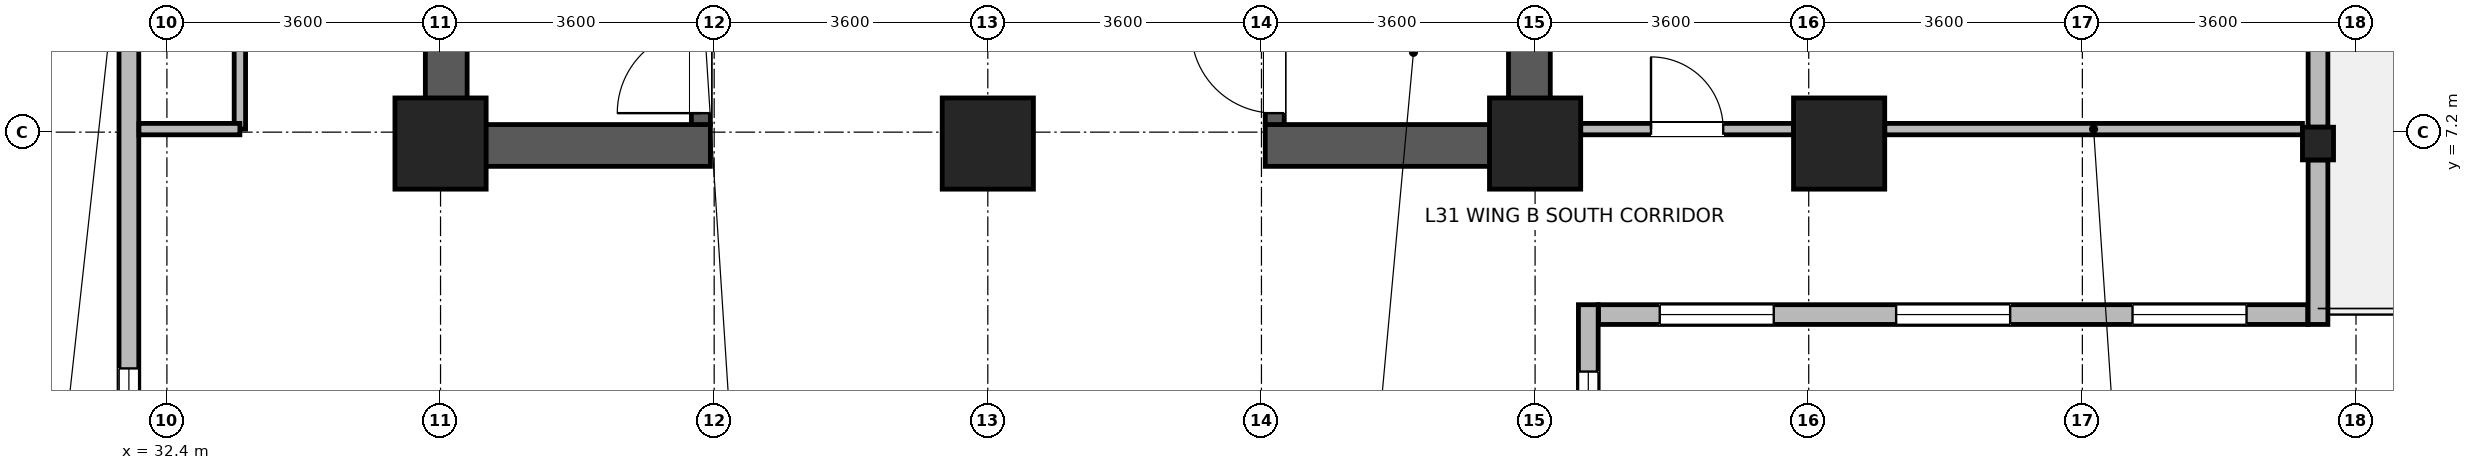
"""IFC4 building model, lengths in metres.
Left out: names, types, materials, properties, quantities, classifications, styles, units other than length and angle.
Written with IfcOpenShell. Run it as: python <this file> out.ifc"""

import sys

from ifc_helpers import new_model, si_unit, direction, frame, frame_2d, origin, origin_2d, place, context, subcontext, project, spatial, rectangle, i_section, extrude, source, transform, mapped, element, fill, save


model = new_model("IFC4")
c1 = context("Model", 3, precision=1e-05, world=origin(), true_north=direction((0.0, 1.0)))
c2 = subcontext(c1, "Body", "Model", "MODEL_VIEW")
j1 = project(units=[si_unit("LENGTHUNIT", "METRE"), si_unit("PLANEANGLEUNIT", "RADIAN")], contexts=[c1])
p1 = place(None, origin())
s1 = spatial("IfcSite", under=j1, at=p1, CompositionType="ELEMENT")
p2 = place(p1, origin())
s2 = spatial("IfcBuilding", under=s1, at=p2, CompositionType="ELEMENT")
p3 = place(p2, frame((0.0, 0.0, 123.0)))
s3 = spatial("IfcBuildingStorey", under=s2, at=p3, CompositionType="ELEMENT", Elevation=123.0)
for number, where, z_axis, x_axis in (
    (1, (36.075, 6.75, 0.0), (0.0, 0.0, 1.0), (0.0, 1.0, 0.0)),
    (2, (50.325, 6.75, 0.0), (0.0, 0.0, 1.0), (0.0, 1.0, 0.0)),
):
    element("IfcWall", number, at=place(p3, frame(where, z_axis=z_axis, x_axis=x_axis)), inside=s3, PredefinedType="SHEAR", context=c2, shape_type="SweptSolid", body=[
        extrude(rectangle(XDim=8.1, YDim=0.55, at=frame_2d((4.05, 0.0))), origin(), (0.0, 0.0, 1.0), 3.45),
    ])
for number, where, z_axis, x_axis in (
    (3, (36.35, 7.025, 0.0), (0.0, 0.0, 1.0), (1.0, 0.0, 0.0)),
    (4, (46.85, 7.025, 0.0), (0.0, 0.0, 1.0), (1.0, 0.0, 0.0)),
):
    element("IfcWall", number, at=place(p3, frame(where, z_axis=z_axis, x_axis=x_axis)), inside=s3, PredefinedType="SHEAR", context=c2, shape_type="SweptSolid", body=[
        extrude(rectangle(XDim=3.2, YDim=0.55, at=frame_2d((1.6, 0.0))), origin(), (0.0, 0.0, 1.0), 3.45),
    ])
p4 = place(p3, frame((39.425, 7.3, 0.0), z_axis=(0.0, 0.0, 1.0), x_axis=(0.0, 1.0, 0.0)))
e5 = element("IfcWall", 5, at=p4, inside=s3, PredefinedType="SHEAR", context=c2, shape_type="SweptSolid", body=[
    extrude(rectangle(XDim=7.0, YDim=0.25, at=frame_2d((3.5, 0.0))), origin(), (0.0, 0.0, 1.0), 3.45),
])
p5 = place(p4, frame((0.15, 0.0, 0.0)))
e6 = element("IfcOpeningElement", 6, at=p5, cuts=e5, PredefinedType="OPENING", context=c2, shape_type="SweptSolid", body=[
    extrude(rectangle(XDim=1.1, YDim=2.08, at=frame_2d((0.55, 1.04))), frame((0.0, 0.135, 0.0), z_axis=(0.0, -1.0, 0.0), x_axis=(1.0, 0.0, 0.0)), (0.0, 0.0, 1.0), 0.27),
])
p6 = place(p3, frame((46.975, 7.3, 0.0), z_axis=(0.0, 0.0, 1.0), x_axis=(0.0, 1.0, 0.0)))
e7 = element("IfcWall", 7, at=p6, inside=s3, PredefinedType="SHEAR", context=c2, shape_type="SweptSolid", body=[
    extrude(rectangle(XDim=7.0, YDim=0.25, at=frame_2d((3.5, 0.0))), origin(), (0.0, 0.0, 1.0), 3.45),
])
p7 = place(p6, frame((0.15, 0.0, 0.0)))
e8 = element("IfcOpeningElement", 8, at=p7, cuts=e7, PredefinedType="OPENING", context=c2, shape_type="SweptSolid", body=[
    extrude(rectangle(XDim=1.1, YDim=2.08, at=frame_2d((0.55, 1.04))), frame((0.0, 0.135, 0.0), z_axis=(0.0, -1.0, 0.0), x_axis=(1.0, 0.0, 0.0)), (0.0, 0.0, 1.0), 0.27),
])
m1 = source(origin(), c2, "Body", "SweptSolid", [
    extrude(rectangle(XDim=1.2, YDim=1.2, at=origin_2d()), origin(), (0.0, 0.0, 1.0), 3.7),
])
for number, where, z_axis, x_axis in (
    (9, (36.0, 7.05, 0.0), (0.0, 0.0, 1.0), (1.0, 0.0, 0.0)),
    (10, (43.2, 7.05, 0.0), (0.0, 0.0, 1.0), (1.0, 0.0, 0.0)),
    (11, (50.4, 7.05, 0.0), (0.0, 0.0, 1.0), (1.0, 0.0, 0.0)),
    (12, (54.4, 7.05, 0.0), (0.0, 0.0, 1.0), (1.0, 0.0, 0.0)),
):
    element("IfcColumn", number, at=place(p3, frame(where, z_axis=z_axis, x_axis=x_axis)), inside=s3, PredefinedType="COLUMN", context=c2, shape_type="MappedRepresentation", body=[
        mapped(m1, transform((0.0, 0.0, 0.0), x_axis=(1.0, 0.0, 0.0), y_axis=(0.0, 1.0, 0.0), z_axis=(0.0, 0.0, 1.0), scale=1.0)),
    ])
m2 = source(origin(), c2, "Body", "SweptSolid", [
    extrude(i_section(OverallWidth=0.409, OverallDepth=0.43, WebThickness=0.024, FlangeThickness=0.033, FilletRadius=0.015, at=origin_2d()), origin(), (0.0, 0.0, 1.0), 3.7),
])
p8 = place(p3, frame((60.7, 7.05, 0.0), z_axis=(0.0, 0.0, 1.0), x_axis=(1.0, 0.0, 0.0)))
e13 = element("IfcColumn", 13, at=p8, inside=s3, PredefinedType="COLUMN", context=c2, shape_type="MappedRepresentation", body=[
    mapped(m2, transform((0.0, 0.0, 0.0), x_axis=(1.0, 0.0, 0.0), y_axis=(0.0, 1.0, 0.0), z_axis=(0.0, 0.0, 1.0), scale=1.0)),
])
p9 = place(p3, frame((51.1, 4.93, 0.0), z_axis=(0.0, 0.0, 1.0), x_axis=(0.0, -1.0, 0.0)))
e14 = element("IfcWall", 14, at=p9, inside=s3, PredefinedType="STANDARD", context=c2, shape_type="SweptSolid", body=[
    extrude(rectangle(XDim=3.26, YDim=0.26, at=frame_2d((1.63, 0.0))), origin(), (0.0, 0.0, 1.0), 3.43),
])
p10 = place(p9, frame((0.88, 0.0, 0.85)))
e15 = element("IfcOpeningElement", 15, at=p10, cuts=e14, PredefinedType="OPENING", context=c2, shape_type="SweptSolid", body=[
    extrude(rectangle(XDim=1.5, YDim=1.85, at=frame_2d((0.75, 0.925))), frame((0.0, 0.14, 0.0), z_axis=(0.0, -1.0, 0.0), x_axis=(1.0, 0.0, 0.0)), (0.0, 0.0, 1.0), 0.28),
])
p11 = place(p3, frame((60.565, 4.8, 0.0), z_axis=(0.0, 0.0, 1.0), x_axis=(-1.0, 0.0, 0.0)))
e16 = element("IfcWall", 16, at=p11, inside=s3, PredefinedType="STANDARD", context=c2, shape_type="SweptSolid", body=[
    extrude(rectangle(XDim=9.33, YDim=0.26, at=frame_2d((4.665, 0.0))), origin(), (0.0, 0.0, 1.0), 3.43),
])
p12 = place(p11, frame((0.805, 0.0, 0.85)))
e17 = element("IfcOpeningElement", 17, at=p12, cuts=e16, PredefinedType="OPENING", context=c2, shape_type="SweptSolid", body=[
    extrude(rectangle(XDim=1.5, YDim=1.85, at=frame_2d((0.75, 0.925))), frame((0.0, 0.14, 0.0), z_axis=(0.0, -1.0, 0.0), x_axis=(1.0, 0.0, 0.0)), (0.0, 0.0, 1.0), 0.28),
])
p13 = place(p11, frame((3.915, 0.0, 0.85)))
e18 = element("IfcOpeningElement", 18, at=p13, cuts=e16, PredefinedType="OPENING", context=c2, shape_type="SweptSolid", body=[
    extrude(rectangle(XDim=1.5, YDim=1.85, at=frame_2d((0.75, 0.925))), frame((0.0, 0.14, 0.0), z_axis=(0.0, -1.0, 0.0), x_axis=(1.0, 0.0, 0.0)), (0.0, 0.0, 1.0), 0.28),
])
p14 = place(p11, frame((7.025, 0.0, 0.85)))
e19 = element("IfcOpeningElement", 19, at=p14, cuts=e16, PredefinedType="OPENING", context=c2, shape_type="SweptSolid", body=[
    extrude(rectangle(XDim=1.5, YDim=1.85, at=frame_2d((0.75, 0.925))), frame((0.0, 0.14, 0.0), z_axis=(0.0, -1.0, 0.0), x_axis=(1.0, 0.0, 0.0)), (0.0, 0.0, 1.0), 0.28),
])
p15 = place(p3, frame((60.7, 6.834, 0.0), z_axis=(0.0, 0.0, 1.0), x_axis=(0.0, -1.0, 0.0)))
e20 = element("IfcWall", 20, at=p15, inside=s3, PredefinedType="STANDARD", context=c2, shape_type="SweptSolid", body=[
    extrude(rectangle(XDim=2.164, YDim=0.26, at=frame_2d((1.082, 0.0))), origin(), (0.0, 0.0, 1.0), 3.43),
])
p16 = place(p3, frame((60.7, 14.334, 0.0), z_axis=(0.0, 0.0, 1.0), x_axis=(0.0, -1.0, 0.0)))
e21 = element("IfcWall", 21, at=p16, inside=s3, PredefinedType="STANDARD", context=c2, shape_type="SweptSolid", body=[
    extrude(rectangle(XDim=7.068, YDim=0.26, at=frame_2d((3.534, 0.0))), origin(), (0.0, 0.0, 1.0), 2.98),
])
p17 = place(p16, frame((2.784, 0.0, 0.0)))
e22 = element("IfcOpeningElement", 22, at=p17, cuts=e21, PredefinedType="OPENING", context=c2, shape_type="SweptSolid", body=[
    extrude(rectangle(XDim=1.5, YDim=2.15, at=frame_2d((0.75, 1.075))), frame((0.0, 0.14, 0.0), z_axis=(0.0, -1.0, 0.0), x_axis=(1.0, 0.0, 0.0)), (0.0, 0.0, 1.0), 0.28),
])
p18 = place(p16, frame((1.017, 0.0, 0.85)))
e23 = element("IfcOpeningElement", 23, at=p18, cuts=e21, PredefinedType="OPENING", context=c2, shape_type="SweptSolid", body=[
    extrude(rectangle(XDim=1.5, YDim=1.85, at=frame_2d((0.75, 0.925))), frame((0.0, 0.14, 0.0), z_axis=(0.0, -1.0, 0.0), x_axis=(1.0, 0.0, 0.0)), (0.0, 0.0, 1.0), 0.28),
])
p19 = place(p16, frame((4.551, 0.0, 0.85)))
e24 = element("IfcOpeningElement", 24, at=p19, cuts=e21, PredefinedType="OPENING", context=c2, shape_type="SweptSolid", body=[
    extrude(rectangle(XDim=1.5, YDim=1.85, at=frame_2d((0.75, 0.925))), frame((0.0, 0.14, 0.0), z_axis=(0.0, -1.0, 0.0), x_axis=(1.0, 0.0, 0.0)), (0.0, 0.0, 1.0), 0.28),
])
p20 = place(p3, frame((31.9, 1.67, 0.0), z_axis=(0.0, 0.0, 1.0), x_axis=(0.0, 1.0, 0.0)))
e25 = element("IfcWall", 25, at=p20, inside=s3, PredefinedType="STANDARD", context=c2, shape_type="SweptSolid", body=[
    extrude(rectangle(XDim=20.06, YDim=0.26, at=frame_2d((10.03, 0.0))), origin(), (0.0, 0.0, 1.0), 3.43),
])
p21 = place(p20, frame((0.922, 0.0, 0.85)))
e26 = element("IfcOpeningElement", 26, at=p21, cuts=e25, PredefinedType="OPENING", context=c2, shape_type="SweptSolid", body=[
    extrude(rectangle(XDim=1.5, YDim=1.85, at=frame_2d((0.75, 0.925))), frame((0.0, 0.14, 0.0), z_axis=(0.0, -1.0, 0.0), x_axis=(1.0, 0.0, 0.0)), (0.0, 0.0, 1.0), 0.28),
])
p22 = place(p20, frame((7.608, 0.0, 0.85)))
e27 = element("IfcOpeningElement", 27, at=p22, cuts=e25, PredefinedType="OPENING", context=c2, shape_type="SweptSolid", body=[
    extrude(rectangle(XDim=1.5, YDim=1.85, at=frame_2d((0.75, 0.925))), frame((0.0, 0.14, 0.0), z_axis=(0.0, -1.0, 0.0), x_axis=(1.0, 0.0, 0.0)), (0.0, 0.0, 1.0), 0.28),
])
p23 = place(p20, frame((10.952, 0.0, 0.85)))
e28 = element("IfcOpeningElement", 28, at=p23, cuts=e25, PredefinedType="OPENING", context=c2, shape_type="SweptSolid", body=[
    extrude(rectangle(XDim=1.5, YDim=1.85, at=frame_2d((0.75, 0.925))), frame((0.0, 0.14, 0.0), z_axis=(0.0, -1.0, 0.0), x_axis=(1.0, 0.0, 0.0)), (0.0, 0.0, 1.0), 0.28),
])
p24 = place(p20, frame((14.295, 0.0, 0.85)))
e29 = element("IfcOpeningElement", 29, at=p24, cuts=e25, PredefinedType="OPENING", context=c2, shape_type="SweptSolid", body=[
    extrude(rectangle(XDim=1.5, YDim=1.85, at=frame_2d((0.75, 0.925))), frame((0.0, 0.14, 0.0), z_axis=(0.0, -1.0, 0.0), x_axis=(1.0, 0.0, 0.0)), (0.0, 0.0, 1.0), 0.28),
])
p25 = place(p20, frame((17.638, 0.0, 0.85)))
e30 = element("IfcOpeningElement", 30, at=p25, cuts=e25, PredefinedType="OPENING", context=c2, shape_type="SweptSolid", body=[
    extrude(rectangle(XDim=1.5, YDim=1.85, at=frame_2d((0.75, 0.925))), frame((0.0, 0.14, 0.0), z_axis=(0.0, -1.0, 0.0), x_axis=(1.0, 0.0, 0.0)), (0.0, 0.0, 1.0), 0.28),
])
p26 = place(p3, frame((51.0, 7.24, 0.0), z_axis=(0.0, 0.0, 1.0), x_axis=(1.0, 0.0, 0.0)))
e31 = element("IfcWall", 31, at=p26, inside=s3, PredefinedType="PARTITIONING", context=c2, shape_type="SweptSolid", body=[
    extrude(rectangle(XDim=2.8, YDim=0.15, at=frame_2d((1.4, 0.0))), origin(), (0.0, 0.0, 1.0), 2.78),
])
p27 = place(p26, frame((0.925, 0.0, 0.0)))
e32 = element("IfcOpeningElement", 32, at=p27, cuts=e31, PredefinedType="OPENING", context=c2, shape_type="SweptSolid", body=[
    extrude(rectangle(XDim=0.95, YDim=2.1, at=frame_2d((0.475, 1.05))), frame((0.0, 0.085, 0.0), z_axis=(0.0, -1.0, 0.0), x_axis=(1.0, 0.0, 0.0)), (0.0, 0.0, 1.0), 0.17),
])
p28 = place(p3, frame((55.0, 7.24, 0.0), z_axis=(0.0, 0.0, 1.0), x_axis=(1.0, 0.0, 0.0)))
e33 = element("IfcWall", 33, at=p28, inside=s3, PredefinedType="PARTITIONING", context=c2, shape_type="SweptSolid", body=[
    extrude(rectangle(XDim=5.496, YDim=0.15, at=frame_2d((2.748, 0.0))), origin(), (0.0, 0.0, 1.0), 2.78),
])
p29 = place(p3, frame((33.36, 7.24, 0.0), z_axis=(0.0, 0.0, 1.0), x_axis=(0.0, 1.0, 0.0)))
e34 = element("IfcWall", 34, at=p29, inside=s3, PredefinedType="PARTITIONING", context=c2, shape_type="SweptSolid", body=[
    extrude(rectangle(XDim=7.26, YDim=0.15, at=frame_2d((3.63, 0.0))), origin(), (0.0, 0.0, 1.0), 3.43),
])
p30 = place(p29, frame((2.98, 0.0, 0.0)))
e35 = element("IfcOpeningElement", 35, at=p30, cuts=e34, PredefinedType="OPENING", context=c2, shape_type="SweptSolid", body=[
    extrude(rectangle(XDim=1.3, YDim=2.12, at=frame_2d((0.65, 1.06))), frame((0.0, 0.085, 0.0), z_axis=(0.0, -1.0, 0.0), x_axis=(1.0, 0.0, 0.0)), (0.0, 0.0, 1.0), 0.17),
])
p31 = place(p3, frame((32.032, 7.24, 0.0), z_axis=(0.0, 0.0, 1.0), x_axis=(1.0, 0.0, 0.0)))
e36 = element("IfcWall", 36, at=p31, inside=s3, PredefinedType="PARTITIONING", context=c2, shape_type="SweptSolid", body=[
    extrude(rectangle(XDim=1.328, YDim=0.15, at=frame_2d((0.664, 0.0))), origin(), (0.0, 0.0, 1.0), 3.43),
])
p32 = place(p10, origin())
e37 = element("IfcWindow", 37, at=p32, inside=s3, PartitioningType="SINGLE_PANEL", PredefinedType="WINDOW", context=c2, shape_type="SweptSolid", body=[
    extrude(rectangle(XDim=1.5, YDim=1.85, at=frame_2d((0.75, 0.925))), frame((0.0, 0.03, 0.0), z_axis=(0.0, -1.0, 0.0), x_axis=(1.0, 0.0, 0.0)), (0.0, 0.0, 1.0), 0.06),
])
fill(e15, e37)
p33 = place(p12, origin())
e38 = element("IfcWindow", 38, at=p33, inside=s3, PartitioningType="SINGLE_PANEL", PredefinedType="WINDOW", context=c2, shape_type="SweptSolid", body=[
    extrude(rectangle(XDim=1.5, YDim=1.85, at=frame_2d((0.75, 0.925))), frame((0.0, 0.03, 0.0), z_axis=(0.0, -1.0, 0.0), x_axis=(1.0, 0.0, 0.0)), (0.0, 0.0, 1.0), 0.06),
])
fill(e17, e38)
p34 = place(p13, origin())
e39 = element("IfcWindow", 39, at=p34, inside=s3, PartitioningType="SINGLE_PANEL", PredefinedType="WINDOW", context=c2, shape_type="SweptSolid", body=[
    extrude(rectangle(XDim=1.5, YDim=1.85, at=frame_2d((0.75, 0.925))), frame((0.0, 0.03, 0.0), z_axis=(0.0, -1.0, 0.0), x_axis=(1.0, 0.0, 0.0)), (0.0, 0.0, 1.0), 0.06),
])
fill(e18, e39)
p35 = place(p14, origin())
e40 = element("IfcWindow", 40, at=p35, inside=s3, PartitioningType="SINGLE_PANEL", PredefinedType="WINDOW", context=c2, shape_type="SweptSolid", body=[
    extrude(rectangle(XDim=1.5, YDim=1.85, at=frame_2d((0.75, 0.925))), frame((0.0, 0.03, 0.0), z_axis=(0.0, -1.0, 0.0), x_axis=(1.0, 0.0, 0.0)), (0.0, 0.0, 1.0), 0.06),
])
fill(e19, e40)
p36 = place(p21, origin())
e41 = element("IfcWindow", 41, at=p36, inside=s3, PartitioningType="SINGLE_PANEL", PredefinedType="WINDOW", context=c2, shape_type="SweptSolid", body=[
    extrude(rectangle(XDim=1.5, YDim=1.85, at=frame_2d((0.75, 0.925))), frame((0.0, 0.03, 0.0), z_axis=(0.0, -1.0, 0.0), x_axis=(1.0, 0.0, 0.0)), (0.0, 0.0, 1.0), 0.06),
])
fill(e26, e41)
p37 = place(p5, origin())
e42 = element("IfcDoor", 42, at=p37, inside=s3, OperationType="SINGLE_SWING_LEFT", PredefinedType="DOOR", context=c2, shape_type="SweptSolid", body=[
    extrude(rectangle(XDim=1.1, YDim=2.08, at=frame_2d((0.55, 1.04))), frame((0.0, 0.025, 0.0), z_axis=(0.0, -1.0, 0.0), x_axis=(1.0, 0.0, 0.0)), (0.0, 0.0, 1.0), 0.05),
])
fill(e6, e42)
p38 = place(p7, origin())
e43 = element("IfcDoor", 43, at=p38, inside=s3, OperationType="SINGLE_SWING_RIGHT", PredefinedType="DOOR", context=c2, shape_type="SweptSolid", body=[
    extrude(rectangle(XDim=1.1, YDim=2.08, at=frame_2d((0.55, 1.04))), frame((0.0, 0.025, 0.0), z_axis=(0.0, -1.0, 0.0), x_axis=(1.0, 0.0, 0.0)), (0.0, 0.0, 1.0), 0.05),
])
fill(e8, e43)
p39 = place(p27, origin())
e44 = element("IfcDoor", 44, at=p39, inside=s3, OperationType="SINGLE_SWING_LEFT", PredefinedType="DOOR", context=c2, shape_type="SweptSolid", body=[
    extrude(rectangle(XDim=0.95, YDim=2.1, at=frame_2d((0.475, 1.05))), frame((0.0, 0.025, 0.0), z_axis=(0.0, -1.0, 0.0), x_axis=(1.0, 0.0, 0.0)), (0.0, 0.0, 1.0), 0.05),
])
fill(e32, e44)
save(model, sys.argv[1])
